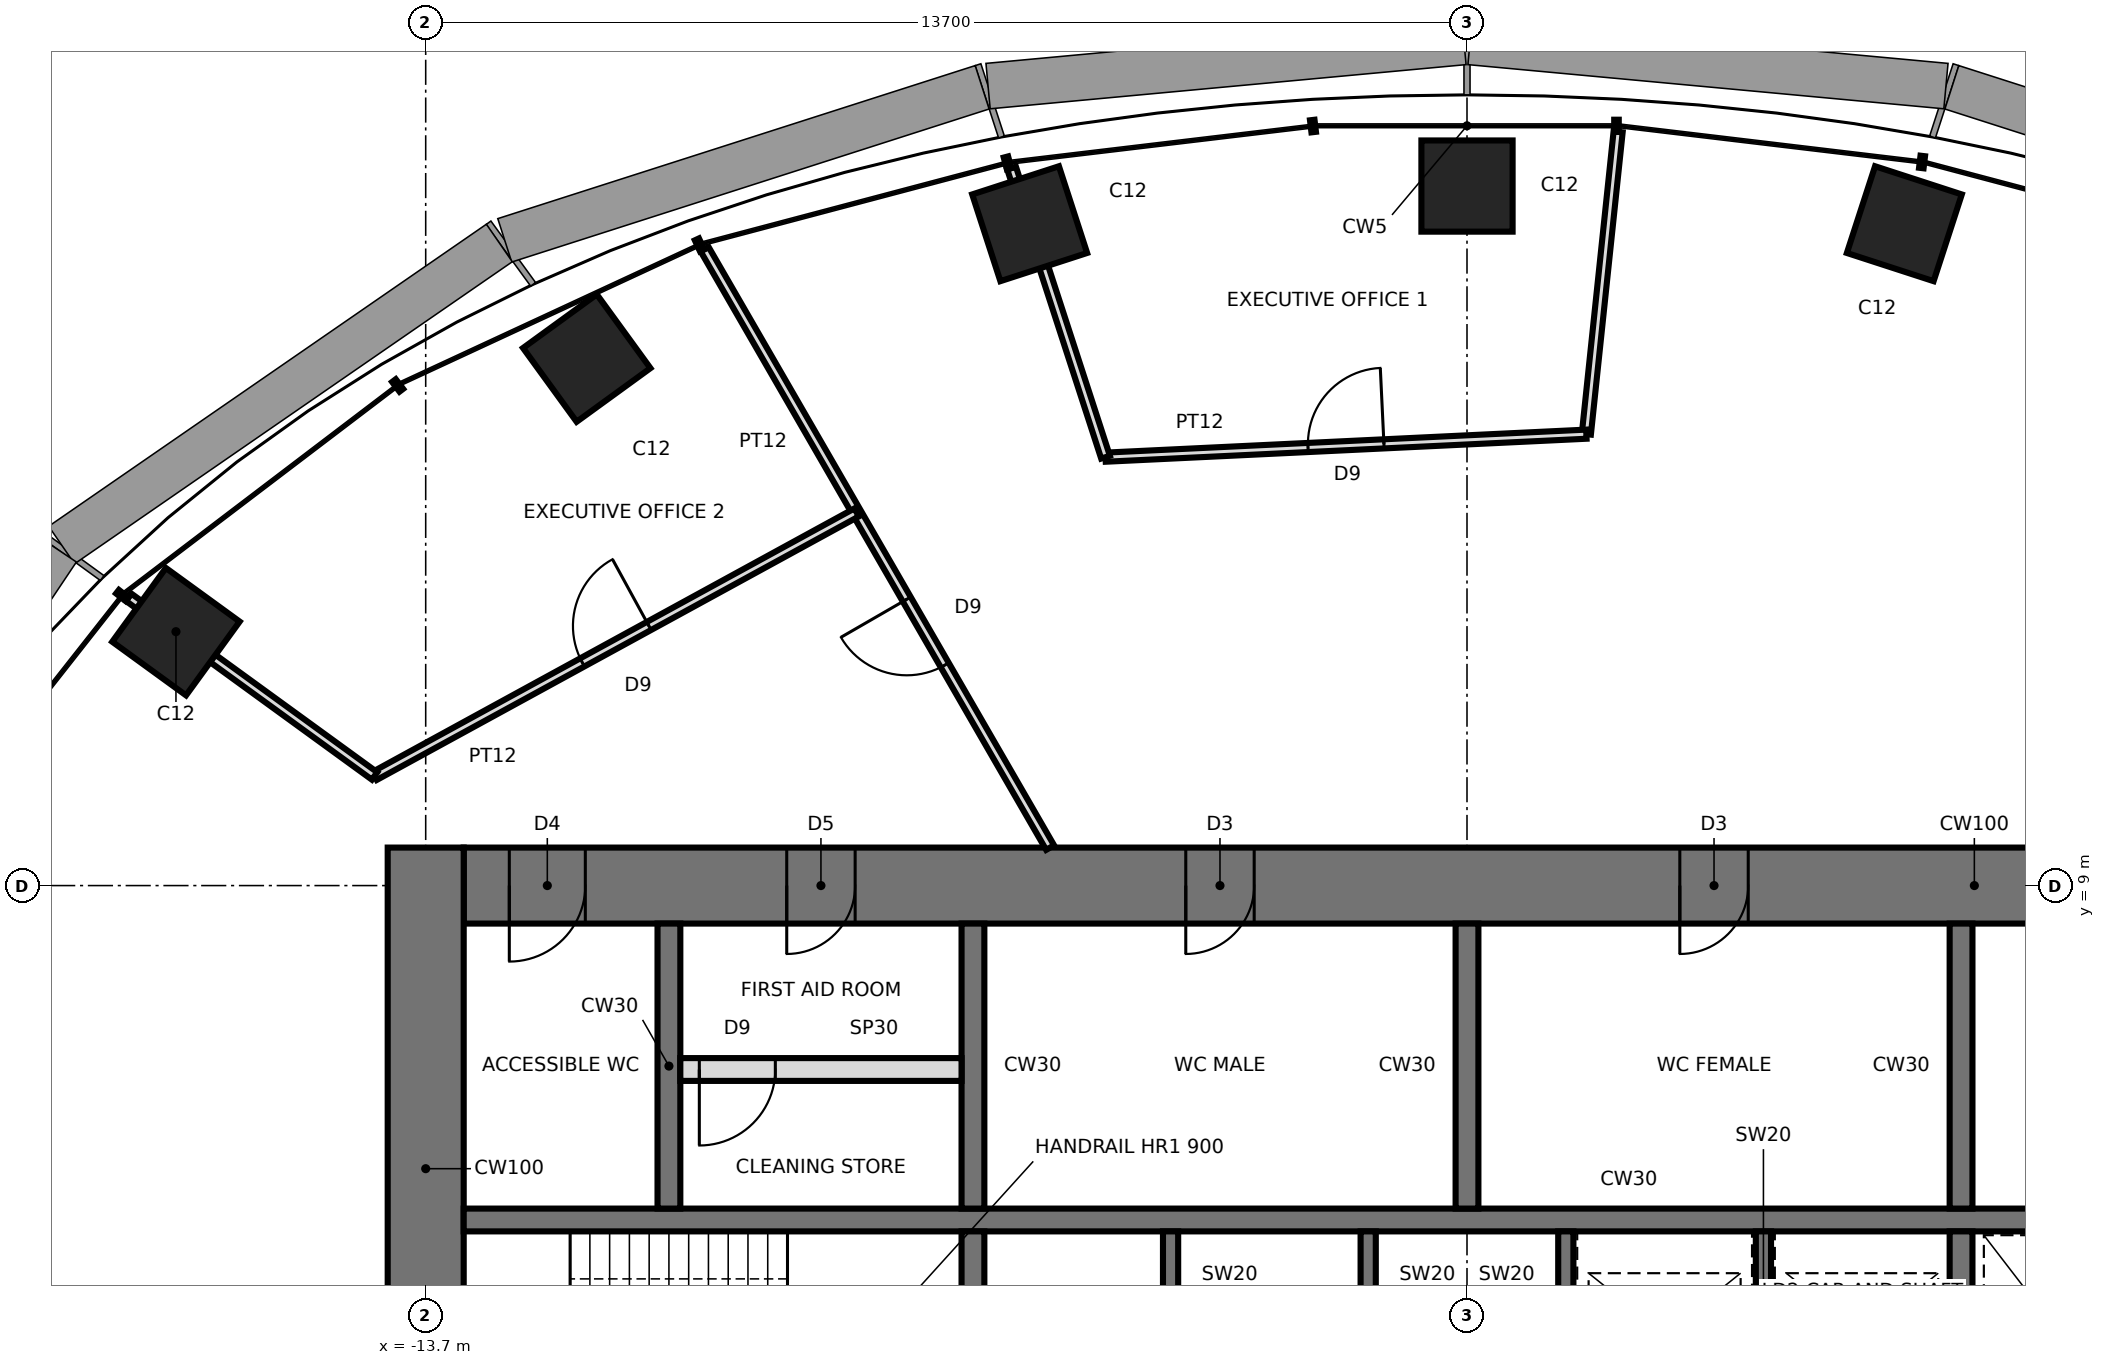
"""IFC4 building model, lengths in metres.
Left out: names, types, materials, properties, quantities, classifications, styles, units other than length and angle.
Written with IfcOpenShell. Run it as: python <this file> out.ifc"""

import sys

from ifc_helpers import new_model, si_unit, direction, frame, frame_2d, origin, origin_2d, place, context, subcontext, project, spatial, rectangle, extrude, element, fill, save


model = new_model("IFC4")
c1 = context("Model", 3, precision=1e-05, world=origin(), true_north=direction((0.0, 1.0)))
c2 = subcontext(c1, "Body", "Model", "MODEL_VIEW")
j1 = project(units=[si_unit("LENGTHUNIT", "METRE"), si_unit("PLANEANGLEUNIT", "RADIAN")], contexts=[c1])
p1 = place(None, origin())
s1 = spatial("IfcSite", under=j1, at=p1, CompositionType="ELEMENT")
p2 = place(p1, origin())
s2 = spatial("IfcBuilding", under=s1, at=p2, CompositionType="ELEMENT")
p3 = place(p2, frame((0.0, 0.0, 256.0)))
s3 = spatial("IfcBuildingStorey", under=s2, at=p3, CompositionType="ELEMENT", Elevation=256.0)
for number, where, z_axis, x_axis in (
    (1, (5.754, 17.708, 0.0), (0.0, 0.0, 1.0), (0.309, 0.951, 0.0)),
    (2, (0.0, 18.204, 0.0), (0.0, 0.0, 1.0), (0.0, 1.0, 0.0)),
    (3, (-5.754, 17.708, 0.0), (0.0, 0.0, 1.0), (-0.309, 0.951, 0.0)),
    (4, (-11.581, 15.94, 0.0), (0.0, 0.0, 1.0), (-0.588, 0.809, 0.0)),
    (5, (-16.986, 12.341, 0.0), (0.0, 0.0, 1.0), (-0.809, 0.588, 0.0)),
):
    element("IfcColumn", number, at=place(p3, frame(where, z_axis=z_axis, x_axis=x_axis)), inside=s3, PredefinedType="COLUMN", context=c2, shape_type="SweptSolid", body=[
        extrude(rectangle(XDim=1.2, YDim=1.2, at=origin_2d()), origin(), (0.0, 0.0, 1.0), 4.2),
    ])
p4 = place(p3, frame((13.2, 9.0, 0.0), z_axis=(0.0, 0.0, 1.0), x_axis=(-1.0, 0.0, 0.0)))
e6 = element("IfcWall", 6, at=p4, inside=s3, PredefinedType="SHEAR", context=c2, shape_type="SweptSolid", body=[
    extrude(rectangle(XDim=26.4, YDim=1.0, at=frame_2d((13.2, 0.0))), origin(), (0.0, 0.0, 1.0), 4.2),
])
p5 = place(p4, frame((2.65, 0.0, 0.0)))
e7 = element("IfcOpeningElement", 7, at=p5, cuts=e6, PredefinedType="OPENING", context=c2, shape_type="SweptSolid", body=[
    extrude(rectangle(XDim=0.9, YDim=2.1, at=frame_2d((0.45, 1.05))), frame((0.0, 0.51, 0.0), z_axis=(0.0, -1.0, 0.0), x_axis=(1.0, 0.0, 0.0)), (0.0, 0.0, 1.0), 1.02),
])
p6 = place(p4, frame((9.5, 0.0, 0.0)))
e8 = element("IfcOpeningElement", 8, at=p6, cuts=e6, PredefinedType="OPENING", context=c2, shape_type="SweptSolid", body=[
    extrude(rectangle(XDim=0.9, YDim=2.1, at=frame_2d((0.45, 1.05))), frame((0.0, 0.51, 0.0), z_axis=(0.0, -1.0, 0.0), x_axis=(1.0, 0.0, 0.0)), (0.0, 0.0, 1.0), 1.02),
])
p7 = place(p4, frame((16.0, 0.0, 0.0)))
e9 = element("IfcOpeningElement", 9, at=p7, cuts=e6, PredefinedType="OPENING", context=c2, shape_type="SweptSolid", body=[
    extrude(rectangle(XDim=0.9, YDim=2.1, at=frame_2d((0.45, 1.05))), frame((0.0, 0.51, 0.0), z_axis=(0.0, -1.0, 0.0), x_axis=(1.0, 0.0, 0.0)), (0.0, 0.0, 1.0), 1.02),
])
p8 = place(p4, frame((21.25, 0.0, 0.0)))
e10 = element("IfcOpeningElement", 10, at=p8, cuts=e6, PredefinedType="OPENING", context=c2, shape_type="SweptSolid", body=[
    extrude(rectangle(XDim=0.9, YDim=2.1, at=frame_2d((0.45, 1.05))), frame((0.0, 0.51, 0.0), z_axis=(0.0, -1.0, 0.0), x_axis=(1.0, 0.0, 0.0)), (0.0, 0.0, 1.0), 1.02),
])
p9 = place(p4, frame((24.8, 0.0, 0.0)))
e11 = element("IfcOpeningElement", 11, at=p9, cuts=e6, PredefinedType="OPENING", context=c2, shape_type="SweptSolid", body=[
    extrude(rectangle(XDim=1.0, YDim=2.1, at=frame_2d((0.5, 1.05))), frame((0.0, 0.51, 0.0), z_axis=(0.0, -1.0, 0.0), x_axis=(1.0, 0.0, 0.0)), (0.0, 0.0, 1.0), 1.02),
])
p10 = place(p3, frame((-13.7, 9.5, 0.0), z_axis=(0.0, 0.0, 1.0), x_axis=(0.0, -1.0, 0.0)))
e12 = element("IfcWall", 12, at=p10, inside=s3, PredefinedType="SHEAR", context=c2, shape_type="SweptSolid", body=[
    extrude(rectangle(XDim=19.0, YDim=1.0, at=frame_2d((9.5, 0.0))), origin(), (0.0, 0.0, 1.0), 4.2),
])
p11 = place(p10, frame((8.6, 0.0, 0.0)))
e13 = element("IfcOpeningElement", 13, at=p11, cuts=e12, PredefinedType="OPENING", context=c2, shape_type="SweptSolid", body=[
    extrude(rectangle(XDim=1.8, YDim=2.4, at=frame_2d((0.9, 1.2))), frame((0.0, 0.51, 0.0), z_axis=(0.0, -1.0, 0.0), x_axis=(1.0, 0.0, 0.0)), (0.0, 0.0, 1.0), 1.02),
])
p12 = place(p3, frame((-13.2, 4.6, 0.0), z_axis=(0.0, 0.0, 1.0), x_axis=(1.0, 0.0, 0.0)))
e14 = element("IfcWall", 14, at=p12, inside=s3, PredefinedType="SHEAR", context=c2, shape_type="SweptSolid", body=[
    extrude(rectangle(XDim=26.4, YDim=0.3, at=frame_2d((13.2, 0.0))), origin(), (0.0, 0.0, 1.0), 4.2),
])
p13 = place(p3, frame((-6.5, 1.75, 0.0), z_axis=(0.0, 0.0, 1.0), x_axis=(0.0, 1.0, 0.0)))
e15 = element("IfcWall", 15, at=p13, inside=s3, PredefinedType="SHEAR", context=c2, shape_type="SweptSolid", body=[
    extrude(rectangle(XDim=2.7, YDim=0.3, at=frame_2d((1.35, 0.0))), origin(), (0.0, 0.0, 1.0), 4.2),
])
p14 = place(p3, frame((-6.5, 4.75, 0.0), z_axis=(0.0, 0.0, 1.0), x_axis=(0.0, 1.0, 0.0)))
e16 = element("IfcWall", 16, at=p14, inside=s3, PredefinedType="SHEAR", context=c2, shape_type="SweptSolid", body=[
    extrude(rectangle(XDim=3.75, YDim=0.3, at=frame_2d((1.875, 0.0))), origin(), (0.0, 0.0, 1.0), 4.2),
])
p15 = place(p3, frame((6.5, 1.75, 0.0), z_axis=(0.0, 0.0, 1.0), x_axis=(0.0, 1.0, 0.0)))
e17 = element("IfcWall", 17, at=p15, inside=s3, PredefinedType="SHEAR", context=c2, shape_type="SweptSolid", body=[
    extrude(rectangle(XDim=2.7, YDim=0.3, at=frame_2d((1.35, 0.0))), origin(), (0.0, 0.0, 1.0), 4.2),
])
p16 = place(p3, frame((6.5, 4.75, 0.0), z_axis=(0.0, 0.0, 1.0), x_axis=(0.0, 1.0, 0.0)))
e18 = element("IfcWall", 18, at=p16, inside=s3, PredefinedType="SHEAR", context=c2, shape_type="SweptSolid", body=[
    extrude(rectangle(XDim=3.75, YDim=0.3, at=frame_2d((1.875, 0.0))), origin(), (0.0, 0.0, 1.0), 4.2),
])
for number, where, z_axis, x_axis in (
    (19, (-3.9, 1.75, 0.0), (0.0, 0.0, 1.0), (0.0, 1.0, 0.0)),
    (20, (-1.3, 1.75, 0.0), (0.0, 0.0, 1.0), (0.0, 1.0, 0.0)),
    (21, (1.3, 1.75, 0.0), (0.0, 0.0, 1.0), (0.0, 1.0, 0.0)),
    (22, (3.9, 1.75, 0.0), (0.0, 0.0, 1.0), (0.0, 1.0, 0.0)),
):
    element("IfcWall", number, at=place(p3, frame(where, z_axis=z_axis, x_axis=x_axis)), inside=s3, PredefinedType="SHEAR", context=c2, shape_type="SweptSolid", body=[
        extrude(rectangle(XDim=2.7, YDim=0.2, at=frame_2d((1.35, 0.0))), origin(), (0.0, 0.0, 1.0), 4.2),
    ])
for number, where, z_axis, x_axis in (
    (23, (0.0, 4.75, 0.0), (0.0, 0.0, 1.0), (0.0, 1.0, 0.0)),
    (24, (-10.5, 4.75, 0.0), (0.0, 0.0, 1.0), (0.0, 1.0, 0.0)),
):
    element("IfcWall", number, at=place(p3, frame(where, z_axis=z_axis, x_axis=x_axis)), inside=s3, PredefinedType="SHEAR", context=c2, shape_type="SweptSolid", body=[
        extrude(rectangle(XDim=3.75, YDim=0.3, at=frame_2d((1.875, 0.0))), origin(), (0.0, 0.0, 1.0), 4.2),
    ])
p17 = place(p3, frame((-10.35, 6.58, 0.0), z_axis=(0.0, 0.0, 1.0), x_axis=(1.0, 0.0, 0.0)))
e25 = element("IfcWall", 25, at=p17, inside=s3, PredefinedType="PARTITIONING", context=c2, shape_type="SweptSolid", body=[
    extrude(rectangle(XDim=3.7, YDim=0.3, at=frame_2d((1.85, 0.0))), origin(), (0.0, 0.0, 1.0), 4.04),
])
p18 = place(p17, frame((0.25, 0.0, 0.0)))
e26 = element("IfcOpeningElement", 26, at=p18, cuts=e25, PredefinedType="OPENING", context=c2, shape_type="SweptSolid", body=[
    extrude(rectangle(XDim=1.0, YDim=2.4, at=frame_2d((0.5, 1.2))), frame((0.0, 0.16, 0.0), z_axis=(0.0, -1.0, 0.0), x_axis=(1.0, 0.0, 0.0)), (0.0, 0.0, 1.0), 0.32),
])
p19 = place(p3, frame((1.57, 14.939, 0.0), z_axis=(0.0, 0.0, 1.0), x_axis=(0.104487806028, 0.994526167776, 0.0)))
e27 = element("IfcWall", 27, at=p19, inside=s3, PredefinedType="PARTITIONING", context=c2, shape_type="SweptSolid", body=[
    extrude(rectangle(XDim=4.0, YDim=0.12, at=frame_2d((2.0, 0.0))), origin(), (0.0, 0.0, 1.0), 4.04),
])
p20 = place(p3, frame((-4.756, 14.637, 0.0), z_axis=(0.0, 0.0, 1.0), x_axis=(0.998858698779, 0.04776295503, 0.0)))
e28 = element("IfcWall", 28, at=p20, inside=s3, PredefinedType="PARTITIONING", context=c2, shape_type="SweptSolid", body=[
    extrude(rectangle(XDim=6.333, YDim=0.12, at=frame_2d((3.167, 0.0))), origin(), (0.0, 0.0, 1.0), 4.04),
])
p21 = place(p20, frame((2.667, 0.0, 0.0)))
e29 = element("IfcOpeningElement", 29, at=p21, cuts=e28, PredefinedType="OPENING", context=c2, shape_type="SweptSolid", body=[
    extrude(rectangle(XDim=1.0, YDim=2.4, at=frame_2d((0.5, 1.2))), frame((0.0, 0.07, 0.0), z_axis=(0.0, -1.0, 0.0), x_axis=(1.0, 0.0, 0.0)), (0.0, 0.0, 1.0), 0.14),
])
p22 = place(p3, frame((-5.992, 18.441, 0.0), z_axis=(0.0, 0.0, 1.0), x_axis=(0.309022586479, -0.951054699292, 0.0)))
e30 = element("IfcWall", 30, at=p22, inside=s3, PredefinedType="PARTITIONING", context=c2, shape_type="SweptSolid", body=[
    extrude(rectangle(XDim=4.0, YDim=0.12, at=frame_2d((2.0, 0.0))), origin(), (0.0, 0.0, 1.0), 3.24),
])
p23 = place(p3, frame((-5.485, 9.5, 0.0), z_axis=(0.0, 0.0, 1.0), x_axis=(-0.499988999718, 0.866031754707, 0.0)))
e31 = element("IfcWall", 31, at=p23, inside=s3, PredefinedType="PARTITIONING", context=c2, shape_type="SweptSolid", body=[
    extrude(rectangle(XDim=9.092, YDim=0.12, at=frame_2d((4.546, 0.0))), origin(), (0.0, 0.0, 1.0), 4.04),
])
p24 = place(p23, frame((2.772, 0.0, 0.0)))
e32 = element("IfcOpeningElement", 32, at=p24, cuts=e31, PredefinedType="OPENING", context=c2, shape_type="SweptSolid", body=[
    extrude(rectangle(XDim=1.0, YDim=2.4, at=frame_2d((0.5, 1.2))), frame((0.0, 0.07, 0.0), z_axis=(0.0, -1.0, 0.0), x_axis=(1.0, 0.0, 0.0)), (0.0, 0.0, 1.0), 0.14),
])
p25 = place(p3, frame((-14.373, 10.442, 0.0), z_axis=(0.0, 0.0, 1.0), x_axis=(0.877444670923, 0.479677860099, 0.0)))
e33 = element("IfcWall", 33, at=p25, inside=s3, PredefinedType="PARTITIONING", context=c2, shape_type="SweptSolid", body=[
    extrude(rectangle(XDim=7.228, YDim=0.12, at=frame_2d((3.614, 0.0))), origin(), (0.0, 0.0, 1.0), 4.04),
])
p26 = place(p25, frame((3.114, 0.0, 0.0)))
e34 = element("IfcOpeningElement", 34, at=p26, cuts=e33, PredefinedType="OPENING", context=c2, shape_type="SweptSolid", body=[
    extrude(rectangle(XDim=1.0, YDim=2.4, at=frame_2d((0.5, 1.2))), frame((0.0, 0.07, 0.0), z_axis=(0.0, -1.0, 0.0), x_axis=(1.0, 0.0, 0.0)), (0.0, 0.0, 1.0), 0.14),
])
p27 = place(p3, frame((-17.609, 12.793, 0.0), z_axis=(0.0, 0.0, 1.0), x_axis=(0.809026317077, -0.587772420479, 0.0)))
e35 = element("IfcWall", 35, at=p27, inside=s3, PredefinedType="PARTITIONING", context=c2, shape_type="SweptSolid", body=[
    extrude(rectangle(XDim=4.0, YDim=0.12, at=frame_2d((2.0, 0.0))), origin(), (0.0, 0.0, 1.0), 3.24),
])
p28 = place(p6, origin())
e36 = element("IfcDoor", 36, at=p28, inside=s3, OperationType="SINGLE_SWING_RIGHT", PredefinedType="DOOR", context=c2, shape_type="SweptSolid", body=[
    extrude(rectangle(XDim=0.82, YDim=2.06, at=frame_2d((0.45, 1.03))), frame((0.0, 0.025, 0.0), z_axis=(0.0, -1.0, 0.0), x_axis=(1.0, 0.0, 0.0)), (0.0, 0.0, 1.0), 0.05),
    extrude(rectangle(XDim=0.04, YDim=2.1, at=frame_2d((0.02, 1.05))), frame((0.0, 0.25, 0.0), z_axis=(0.0, -1.0, 0.0), x_axis=(1.0, 0.0, 0.0)), (0.0, 0.0, 1.0), 0.5),
    extrude(rectangle(XDim=0.04, YDim=2.1, at=frame_2d((0.88, 1.05))), frame((0.0, 0.25, 0.0), z_axis=(0.0, -1.0, 0.0), x_axis=(1.0, 0.0, 0.0)), (0.0, 0.0, 1.0), 0.5),
    extrude(rectangle(XDim=0.82, YDim=0.04, at=frame_2d((0.45, 2.08))), frame((0.0, 0.25, 0.0), z_axis=(0.0, -1.0, 0.0), x_axis=(1.0, 0.0, 0.0)), (0.0, 0.0, 1.0), 0.5),
])
fill(e8, e36)
p29 = place(p7, origin())
e37 = element("IfcDoor", 37, at=p29, inside=s3, OperationType="SINGLE_SWING_RIGHT", PredefinedType="DOOR", context=c2, shape_type="SweptSolid", body=[
    extrude(rectangle(XDim=0.82, YDim=2.06, at=frame_2d((0.45, 1.03))), frame((0.0, 0.025, 0.0), z_axis=(0.0, -1.0, 0.0), x_axis=(1.0, 0.0, 0.0)), (0.0, 0.0, 1.0), 0.05),
    extrude(rectangle(XDim=0.04, YDim=2.1, at=frame_2d((0.02, 1.05))), frame((0.0, 0.25, 0.0), z_axis=(0.0, -1.0, 0.0), x_axis=(1.0, 0.0, 0.0)), (0.0, 0.0, 1.0), 0.5),
    extrude(rectangle(XDim=0.04, YDim=2.1, at=frame_2d((0.88, 1.05))), frame((0.0, 0.25, 0.0), z_axis=(0.0, -1.0, 0.0), x_axis=(1.0, 0.0, 0.0)), (0.0, 0.0, 1.0), 0.5),
    extrude(rectangle(XDim=0.82, YDim=0.04, at=frame_2d((0.45, 2.08))), frame((0.0, 0.25, 0.0), z_axis=(0.0, -1.0, 0.0), x_axis=(1.0, 0.0, 0.0)), (0.0, 0.0, 1.0), 0.5),
])
fill(e9, e37)
p30 = place(p8, origin())
e38 = element("IfcDoor", 38, at=p30, inside=s3, OperationType="SINGLE_SWING_RIGHT", PredefinedType="DOOR", context=c2, shape_type="SweptSolid", body=[
    extrude(rectangle(XDim=0.82, YDim=2.06, at=frame_2d((0.45, 1.03))), frame((0.0, 0.025, 0.0), z_axis=(0.0, -1.0, 0.0), x_axis=(1.0, 0.0, 0.0)), (0.0, 0.0, 1.0), 0.05),
    extrude(rectangle(XDim=0.04, YDim=2.1, at=frame_2d((0.02, 1.05))), frame((0.0, 0.25, 0.0), z_axis=(0.0, -1.0, 0.0), x_axis=(1.0, 0.0, 0.0)), (0.0, 0.0, 1.0), 0.5),
    extrude(rectangle(XDim=0.04, YDim=2.1, at=frame_2d((0.88, 1.05))), frame((0.0, 0.25, 0.0), z_axis=(0.0, -1.0, 0.0), x_axis=(1.0, 0.0, 0.0)), (0.0, 0.0, 1.0), 0.5),
    extrude(rectangle(XDim=0.82, YDim=0.04, at=frame_2d((0.45, 2.08))), frame((0.0, 0.25, 0.0), z_axis=(0.0, -1.0, 0.0), x_axis=(1.0, 0.0, 0.0)), (0.0, 0.0, 1.0), 0.5),
])
fill(e10, e38)
p31 = place(p9, origin())
e39 = element("IfcDoor", 39, at=p31, inside=s3, OperationType="SINGLE_SWING_RIGHT", PredefinedType="DOOR", context=c2, shape_type="SweptSolid", body=[
    extrude(rectangle(XDim=0.92, YDim=2.06, at=frame_2d((0.5, 1.03))), frame((0.0, 0.025, 0.0), z_axis=(0.0, -1.0, 0.0), x_axis=(1.0, 0.0, 0.0)), (0.0, 0.0, 1.0), 0.05),
    extrude(rectangle(XDim=0.04, YDim=2.1, at=frame_2d((0.02, 1.05))), frame((0.0, 0.25, 0.0), z_axis=(0.0, -1.0, 0.0), x_axis=(1.0, 0.0, 0.0)), (0.0, 0.0, 1.0), 0.5),
    extrude(rectangle(XDim=0.04, YDim=2.1, at=frame_2d((0.98, 1.05))), frame((0.0, 0.25, 0.0), z_axis=(0.0, -1.0, 0.0), x_axis=(1.0, 0.0, 0.0)), (0.0, 0.0, 1.0), 0.5),
    extrude(rectangle(XDim=0.92, YDim=0.04, at=frame_2d((0.5, 2.08))), frame((0.0, 0.25, 0.0), z_axis=(0.0, -1.0, 0.0), x_axis=(1.0, 0.0, 0.0)), (0.0, 0.0, 1.0), 0.5),
])
fill(e11, e39)
p32 = place(p18, frame((1.0, 0.0, 0.0), z_axis=(0.0, 0.0, 1.0), x_axis=(-1.0, 0.0, 0.0)))
e40 = element("IfcDoor", 40, at=p32, inside=s3, OperationType="SINGLE_SWING_RIGHT", PredefinedType="DOOR", context=c2, shape_type="SweptSolid", body=[
    extrude(rectangle(XDim=1.0, YDim=2.4, at=frame_2d((0.5, 1.2))), frame((0.0, 0.025, 0.0), z_axis=(0.0, -1.0, 0.0), x_axis=(1.0, 0.0, 0.0)), (0.0, 0.0, 1.0), 0.05),
])
fill(e26, e40)
p33 = place(p21, origin())
e41 = element("IfcDoor", 41, at=p33, inside=s3, OperationType="SINGLE_SWING_RIGHT", PredefinedType="DOOR", context=c2, shape_type="SweptSolid", body=[
    extrude(rectangle(XDim=1.0, YDim=2.4, at=frame_2d((0.5, 1.2))), frame((0.0, 0.025, 0.0), z_axis=(0.0, -1.0, 0.0), x_axis=(1.0, 0.0, 0.0)), (0.0, 0.0, 1.0), 0.05),
])
fill(e29, e41)
p34 = place(p26, origin())
e42 = element("IfcDoor", 42, at=p34, inside=s3, OperationType="SINGLE_SWING_RIGHT", PredefinedType="DOOR", context=c2, shape_type="SweptSolid", body=[
    extrude(rectangle(XDim=1.0, YDim=2.4, at=frame_2d((0.5, 1.2))), frame((0.0, 0.025, 0.0), z_axis=(0.0, -1.0, 0.0), x_axis=(1.0, 0.0, 0.0)), (0.0, 0.0, 1.0), 0.05),
])
fill(e34, e42)
p35 = place(p24, origin())
e43 = element("IfcDoor", 43, at=p35, inside=s3, OperationType="SINGLE_SWING_RIGHT", PredefinedType="DOOR", context=c2, shape_type="SweptSolid", body=[
    extrude(rectangle(XDim=1.0, YDim=2.4, at=frame_2d((0.5, 1.2))), frame((0.0, 0.025, 0.0), z_axis=(0.0, -1.0, 0.0), x_axis=(1.0, 0.0, 0.0)), (0.0, 0.0, 1.0), 0.05),
])
fill(e32, e43)
save(model, sys.argv[1])
